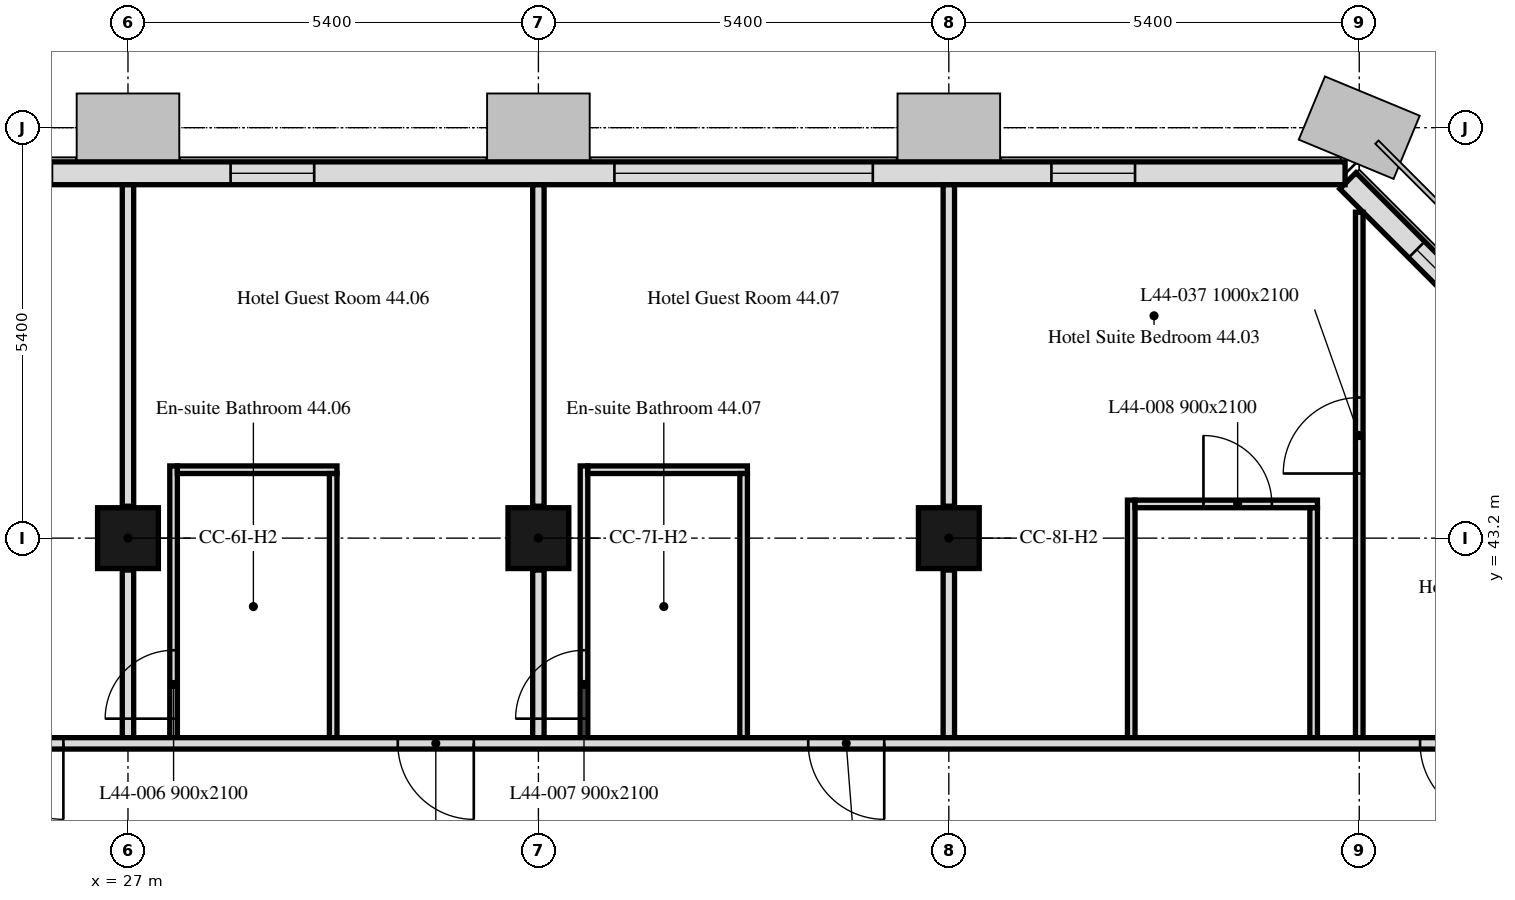
"""IFC4 building model, lengths in metres.
Left out: names, types, materials, properties, quantities, classifications, styles, units other than length and angle.
Written with IfcOpenShell. Run it as: python <this file> out.ifc"""

import sys

from ifc_helpers import new_model, si_unit, direction, frame, frame_2d, origin, origin_2d, place, context, subcontext, project, spatial, rectangle, extrude, element, fill, save


model = new_model("IFC4")
c1 = context("Model", 3, precision=1e-05, world=origin(), true_north=direction((0.0, 1.0)))
c2 = subcontext(c1, "Body", "Model", "MODEL_VIEW")
j1 = project(units=[si_unit("LENGTHUNIT", "METRE"), si_unit("PLANEANGLEUNIT", "RADIAN")], contexts=[c1])
p1 = place(None, origin())
s1 = spatial("IfcSite", under=j1, at=p1, CompositionType="ELEMENT")
p2 = place(p1, origin())
s2 = spatial("IfcBuilding", under=s1, at=p2, CompositionType="ELEMENT")
p3 = place(p2, frame((0.0, 0.0, 184.0)))
s3 = spatial("IfcBuildingStorey", under=s2, at=p3, CompositionType="ELEMENT", Elevation=184.0)
for number, where, z_axis, x_axis in (
    (1, (27.0, 43.2, 0.0), (0.0, 0.0, 1.0), (1.0, 0.0, 0.0)),
    (2, (32.4, 43.2, 0.0), (0.0, 0.0, 1.0), (1.0, 0.0, 0.0)),
    (3, (37.8, 43.2, 0.0), (0.0, 0.0, 1.0), (1.0, 0.0, 0.0)),
):
    element("IfcColumn", number, at=place(p3, frame(where, z_axis=z_axis, x_axis=x_axis)), inside=s3, PredefinedType="COLUMN", context=c2, shape_type="SweptSolid", body=[
        extrude(rectangle(XDim=0.8, YDim=0.8, at=origin_2d()), origin(), (0.0, 0.0, 1.0), 3.0),
    ])
p4 = place(p3, frame((47.901, 43.051, 0.0), z_axis=(0.0, 0.0, 1.0), x_axis=(-0.707106781187, 0.707106781187, 0.0)))
e4 = element("IfcWall", 4, at=p4, inside=s3, PredefinedType="SOLIDWALL", context=c2, shape_type="SweptSolid", body=[
    extrude(rectangle(XDim=6.86, YDim=0.3, at=frame_2d((3.43, 0.0))), origin(), (0.0, 0.0, 1.0), 3.0),
])
p5 = place(p4, frame((1.28, 0.0, 0.9)))
e5 = element("IfcOpeningElement", 5, at=p5, cuts=e4, PredefinedType="OPENING", context=c2, shape_type="SweptSolid", body=[
    extrude(rectangle(XDim=1.1, YDim=1.7, at=frame_2d((0.55, 0.85))), frame((0.0, 0.16, 0.0), z_axis=(0.0, -1.0, 0.0), x_axis=(1.0, 0.0, 0.0)), (0.0, 0.0, 1.0), 0.32),
])
p6 = place(p4, frame((4.48, 0.0, 0.9)))
e6 = element("IfcOpeningElement", 6, at=p6, cuts=e4, PredefinedType="OPENING", context=c2, shape_type="SweptSolid", body=[
    extrude(rectangle(XDim=1.1, YDim=1.7, at=frame_2d((0.55, 0.85))), frame((0.0, 0.16, 0.0), z_axis=(0.0, -1.0, 0.0), x_axis=(1.0, 0.0, 0.0)), (0.0, 0.0, 1.0), 0.32),
])
p7 = place(p3, frame((43.014, 48.0, 0.0), z_axis=(0.0, 0.0, 1.0), x_axis=(-1.0, 0.0, 0.0)))
e7 = element("IfcWall", 7, at=p7, inside=s3, PredefinedType="SOLIDWALL", context=c2, shape_type="SweptSolid", body=[
    extrude(rectangle(XDim=32.027, YDim=0.3, at=frame_2d((16.014, 0.0))), origin(), (0.0, 0.0, 1.0), 3.0),
])
p8 = place(p7, frame((2.764, 0.0, 0.9)))
e8 = element("IfcOpeningElement", 8, at=p8, cuts=e7, PredefinedType="OPENING", context=c2, shape_type="SweptSolid", body=[
    extrude(rectangle(XDim=1.1, YDim=1.7, at=frame_2d((0.55, 0.85))), frame((0.0, 0.16, 0.0), z_axis=(0.0, -1.0, 0.0), x_axis=(1.0, 0.0, 0.0)), (0.0, 0.0, 1.0), 0.32),
])
p9 = place(p7, frame((6.214, 0.0, 0.9)))
e9 = element("IfcOpeningElement", 9, at=p9, cuts=e7, PredefinedType="OPENING", context=c2, shape_type="SweptSolid", body=[
    extrude(rectangle(XDim=3.4, YDim=1.7, at=frame_2d((1.7, 0.85))), frame((0.0, 0.16, 0.0), z_axis=(0.0, -1.0, 0.0), x_axis=(1.0, 0.0, 0.0)), (0.0, 0.0, 1.0), 0.32),
])
p10 = place(p7, frame((13.564, 0.0, 0.9)))
e10 = element("IfcOpeningElement", 10, at=p10, cuts=e7, PredefinedType="OPENING", context=c2, shape_type="SweptSolid", body=[
    extrude(rectangle(XDim=1.1, YDim=1.7, at=frame_2d((0.55, 0.85))), frame((0.0, 0.16, 0.0), z_axis=(0.0, -1.0, 0.0), x_axis=(1.0, 0.0, 0.0)), (0.0, 0.0, 1.0), 0.32),
])
p11 = place(p7, frame((17.014, 0.0, 0.9)))
e11 = element("IfcOpeningElement", 11, at=p11, cuts=e7, PredefinedType="OPENING", context=c2, shape_type="SweptSolid", body=[
    extrude(rectangle(XDim=3.4, YDim=1.7, at=frame_2d((1.7, 0.85))), frame((0.0, 0.16, 0.0), z_axis=(0.0, -1.0, 0.0), x_axis=(1.0, 0.0, 0.0)), (0.0, 0.0, 1.0), 0.32),
])
p12 = place(p7, frame((24.364, 0.0, 0.9)))
e12 = element("IfcOpeningElement", 12, at=p12, cuts=e7, PredefinedType="OPENING", context=c2, shape_type="SweptSolid", body=[
    extrude(rectangle(XDim=1.1, YDim=1.7, at=frame_2d((0.55, 0.85))), frame((0.0, 0.16, 0.0), z_axis=(0.0, -1.0, 0.0), x_axis=(1.0, 0.0, 0.0)), (0.0, 0.0, 1.0), 0.32),
])
p13 = place(p7, frame((27.814, 0.0, 0.9)))
e13 = element("IfcOpeningElement", 13, at=p13, cuts=e7, PredefinedType="OPENING", context=c2, shape_type="SweptSolid", body=[
    extrude(rectangle(XDim=3.4, YDim=1.7, at=frame_2d((1.7, 0.85))), frame((0.0, 0.16, 0.0), z_axis=(0.0, -1.0, 0.0), x_axis=(1.0, 0.0, 0.0)), (0.0, 0.0, 1.0), 0.32),
])
p14 = place(p3, frame((27.0, 40.575, 0.0), z_axis=(0.0, 0.0, 1.0), x_axis=(0.0, 1.0, 0.0)))
e14 = element("IfcWall", 14, at=p14, inside=s3, PredefinedType="PARTITIONING", context=c2, shape_type="SweptSolid", body=[
    extrude(rectangle(XDim=2.205, YDim=0.15, at=frame_2d((1.103, 0.0))), origin(), (0.0, 0.0, 1.0), 2.4),
])
p15 = place(p3, frame((27.0, 43.62, 0.0), z_axis=(0.0, 0.0, 1.0), x_axis=(0.0, 1.0, 0.0)))
e15 = element("IfcWall", 15, at=p15, inside=s3, PredefinedType="PARTITIONING", context=c2, shape_type="SweptSolid", body=[
    extrude(rectangle(XDim=4.229, YDim=0.15, at=frame_2d((2.115, 0.0))), origin(), (0.0, 0.0, 1.0), 2.4),
])
p16 = place(p3, frame((27.6, 40.575, 0.0), z_axis=(0.0, 0.0, 1.0), x_axis=(0.0, 1.0, 0.0)))
e16 = element("IfcWall", 16, at=p16, inside=s3, PredefinedType="PARTITIONING", context=c2, shape_type="SweptSolid", body=[
    extrude(rectangle(XDim=3.575, YDim=0.1, at=frame_2d((1.788, 0.0))), origin(), (0.0, 0.0, 1.0), 3.0),
])
p17 = place(p16, frame((0.25, 0.0, 0.0)))
e17 = element("IfcOpeningElement", 17, at=p17, cuts=e16, PredefinedType="OPENING", context=c2, shape_type="SweptSolid", body=[
    extrude(rectangle(XDim=0.9, YDim=2.1, at=frame_2d((0.45, 1.05))), frame((0.0, 0.05, 0.0), z_axis=(0.0, -1.0, 0.0), x_axis=(1.0, 0.0, 0.0)), (0.0, 0.0, 1.0), 0.1),
])
p18 = place(p3, frame((27.65, 44.1, 0.0), z_axis=(0.0, 0.0, 1.0), x_axis=(1.0, 0.0, 0.0)))
e18 = element("IfcWall", 18, at=p18, inside=s3, PredefinedType="PARTITIONING", context=c2, shape_type="SweptSolid", body=[
    extrude(rectangle(XDim=2.1, YDim=0.1, at=frame_2d((1.05, 0.0))), origin(), (0.0, 0.0, 1.0), 3.0),
])
p19 = place(p3, frame((29.7, 44.05, 0.0), z_axis=(0.0, 0.0, 1.0), x_axis=(0.0, -1.0, 0.0)))
e19 = element("IfcWall", 19, at=p19, inside=s3, PredefinedType="PARTITIONING", context=c2, shape_type="SweptSolid", body=[
    extrude(rectangle(XDim=3.475, YDim=0.1, at=frame_2d((1.738, 0.0))), origin(), (0.0, 0.0, 1.0), 3.0),
])
p20 = place(p3, frame((32.4, 40.575, 0.0), z_axis=(0.0, 0.0, 1.0), x_axis=(0.0, 1.0, 0.0)))
e20 = element("IfcWall", 20, at=p20, inside=s3, PredefinedType="PARTITIONING", context=c2, shape_type="SweptSolid", body=[
    extrude(rectangle(XDim=2.205, YDim=0.15, at=frame_2d((1.103, 0.0))), origin(), (0.0, 0.0, 1.0), 2.4),
])
p21 = place(p3, frame((32.4, 43.62, 0.0), z_axis=(0.0, 0.0, 1.0), x_axis=(0.0, 1.0, 0.0)))
e21 = element("IfcWall", 21, at=p21, inside=s3, PredefinedType="PARTITIONING", context=c2, shape_type="SweptSolid", body=[
    extrude(rectangle(XDim=4.229, YDim=0.15, at=frame_2d((2.115, 0.0))), origin(), (0.0, 0.0, 1.0), 2.4),
])
p22 = place(p3, frame((33.0, 40.575, 0.0), z_axis=(0.0, 0.0, 1.0), x_axis=(0.0, 1.0, 0.0)))
e22 = element("IfcWall", 22, at=p22, inside=s3, PredefinedType="PARTITIONING", context=c2, shape_type="SweptSolid", body=[
    extrude(rectangle(XDim=3.575, YDim=0.1, at=frame_2d((1.788, 0.0))), origin(), (0.0, 0.0, 1.0), 3.0),
])
p23 = place(p22, frame((0.25, 0.0, 0.0)))
e23 = element("IfcOpeningElement", 23, at=p23, cuts=e22, PredefinedType="OPENING", context=c2, shape_type="SweptSolid", body=[
    extrude(rectangle(XDim=0.9, YDim=2.1, at=frame_2d((0.45, 1.05))), frame((0.0, 0.05, 0.0), z_axis=(0.0, -1.0, 0.0), x_axis=(1.0, 0.0, 0.0)), (0.0, 0.0, 1.0), 0.1),
])
p24 = place(p3, frame((33.05, 44.1, 0.0), z_axis=(0.0, 0.0, 1.0), x_axis=(1.0, 0.0, 0.0)))
e24 = element("IfcWall", 24, at=p24, inside=s3, PredefinedType="PARTITIONING", context=c2, shape_type="SweptSolid", body=[
    extrude(rectangle(XDim=2.1, YDim=0.1, at=frame_2d((1.05, 0.0))), origin(), (0.0, 0.0, 1.0), 3.0),
])
p25 = place(p3, frame((35.1, 44.05, 0.0), z_axis=(0.0, 0.0, 1.0), x_axis=(0.0, -1.0, 0.0)))
e25 = element("IfcWall", 25, at=p25, inside=s3, PredefinedType="PARTITIONING", context=c2, shape_type="SweptSolid", body=[
    extrude(rectangle(XDim=3.475, YDim=0.1, at=frame_2d((1.738, 0.0))), origin(), (0.0, 0.0, 1.0), 3.0),
])
p26 = place(p3, frame((37.8, 40.575, 0.0), z_axis=(0.0, 0.0, 1.0), x_axis=(0.0, 1.0, 0.0)))
e26 = element("IfcWall", 26, at=p26, inside=s3, PredefinedType="PARTITIONING", context=c2, shape_type="SweptSolid", body=[
    extrude(rectangle(XDim=2.205, YDim=0.15, at=frame_2d((1.103, 0.0))), origin(), (0.0, 0.0, 1.0), 2.4),
])
p27 = place(p3, frame((37.8, 43.62, 0.0), z_axis=(0.0, 0.0, 1.0), x_axis=(0.0, 1.0, 0.0)))
e27 = element("IfcWall", 27, at=p27, inside=s3, PredefinedType="PARTITIONING", context=c2, shape_type="SweptSolid", body=[
    extrude(rectangle(XDim=4.229, YDim=0.15, at=frame_2d((2.115, 0.0))), origin(), (0.0, 0.0, 1.0), 2.4),
])
p28 = place(p3, frame((40.2, 40.575, 0.0), z_axis=(0.0, 0.0, 1.0), x_axis=(0.0, 1.0, 0.0)))
e28 = element("IfcWall", 28, at=p28, inside=s3, PredefinedType="PARTITIONING", context=c2, shape_type="SweptSolid", body=[
    extrude(rectangle(XDim=3.125, YDim=0.1, at=frame_2d((1.562, 0.0))), origin(), (0.0, 0.0, 1.0), 3.0),
])
p29 = place(p3, frame((40.25, 43.65, 0.0), z_axis=(0.0, 0.0, 1.0), x_axis=(1.0, 0.0, 0.0)))
e29 = element("IfcWall", 29, at=p29, inside=s3, PredefinedType="PARTITIONING", context=c2, shape_type="SweptSolid", body=[
    extrude(rectangle(XDim=2.4, YDim=0.1, at=frame_2d((1.2, 0.0))), origin(), (0.0, 0.0, 1.0), 3.0),
])
p30 = place(p29, frame((0.9, 0.0, 0.0)))
e30 = element("IfcOpeningElement", 30, at=p30, cuts=e29, PredefinedType="OPENING", context=c2, shape_type="SweptSolid", body=[
    extrude(rectangle(XDim=0.9, YDim=2.1, at=frame_2d((0.45, 1.05))), frame((0.0, 0.05, 0.0), z_axis=(0.0, -1.0, 0.0), x_axis=(1.0, 0.0, 0.0)), (0.0, 0.0, 1.0), 0.1),
])
p31 = place(p3, frame((42.6, 43.6, 0.0), z_axis=(0.0, 0.0, 1.0), x_axis=(0.0, -1.0, 0.0)))
e31 = element("IfcWall", 31, at=p31, inside=s3, PredefinedType="PARTITIONING", context=c2, shape_type="SweptSolid", body=[
    extrude(rectangle(XDim=3.025, YDim=0.1, at=frame_2d((1.513, 0.0))), origin(), (0.0, 0.0, 1.0), 3.0),
])
p32 = place(p3, frame((43.2, 40.575, 0.0), z_axis=(0.0, 0.0, 1.0), x_axis=(0.0, 1.0, 0.0)))
e32 = element("IfcWall", 32, at=p32, inside=s3, PredefinedType="PARTITIONING", context=c2, shape_type="SweptSolid", body=[
    extrude(rectangle(XDim=6.913, YDim=0.1, at=frame_2d((3.457, 0.0))), origin(), (0.0, 0.0, 1.0), 3.0),
])
p33 = place(p32, frame((3.475, 0.0, 0.0)))
e33 = element("IfcOpeningElement", 33, at=p33, cuts=e32, PredefinedType="OPENING", context=c2, shape_type="SweptSolid", body=[
    extrude(rectangle(XDim=1.0, YDim=2.1, at=frame_2d((0.5, 1.05))), frame((0.0, 0.05, 0.0), z_axis=(0.0, -1.0, 0.0), x_axis=(1.0, 0.0, 0.0)), (0.0, 0.0, 1.0), 0.1),
])
p34 = place(p3, frame((47.849, 40.5, 0.0), z_axis=(0.0, 0.0, 1.0), x_axis=(-1.0, 0.0, 0.0)))
e34 = element("IfcWall", 34, at=p34, inside=s3, PredefinedType="PARTITIONING", context=c2, shape_type="SweptSolid", body=[
    extrude(rectangle(XDim=41.698, YDim=0.15, at=frame_2d((20.849, 0.0))), origin(), (0.0, 0.0, 1.0), 2.4),
])
p35 = place(p34, frame((37.899, 0.0, 0.0)))
e35 = element("IfcOpeningElement", 35, at=p35, cuts=e34, PredefinedType="OPENING", context=c2, shape_type="SweptSolid", body=[
    extrude(rectangle(XDim=1.0, YDim=2.1, at=frame_2d((0.5, 1.05))), frame((0.0, 0.075, 0.0), z_axis=(0.0, -1.0, 0.0), x_axis=(1.0, 0.0, 0.0)), (0.0, 0.0, 1.0), 0.15),
])
p36 = place(p34, frame((32.499, 0.0, 0.0)))
e36 = element("IfcOpeningElement", 36, at=p36, cuts=e34, PredefinedType="OPENING", context=c2, shape_type="SweptSolid", body=[
    extrude(rectangle(XDim=1.0, YDim=2.1, at=frame_2d((0.5, 1.05))), frame((0.0, 0.075, 0.0), z_axis=(0.0, -1.0, 0.0), x_axis=(1.0, 0.0, 0.0)), (0.0, 0.0, 1.0), 0.15),
])
p37 = place(p34, frame((27.099, 0.0, 0.0)))
e37 = element("IfcOpeningElement", 37, at=p37, cuts=e34, PredefinedType="OPENING", context=c2, shape_type="SweptSolid", body=[
    extrude(rectangle(XDim=1.0, YDim=2.1, at=frame_2d((0.5, 1.05))), frame((0.0, 0.075, 0.0), z_axis=(0.0, -1.0, 0.0), x_axis=(1.0, 0.0, 0.0)), (0.0, 0.0, 1.0), 0.15),
])
p38 = place(p34, frame((21.699, 0.0, 0.0)))
e38 = element("IfcOpeningElement", 38, at=p38, cuts=e34, PredefinedType="OPENING", context=c2, shape_type="SweptSolid", body=[
    extrude(rectangle(XDim=1.0, YDim=2.1, at=frame_2d((0.5, 1.05))), frame((0.0, 0.075, 0.0), z_axis=(0.0, -1.0, 0.0), x_axis=(1.0, 0.0, 0.0)), (0.0, 0.0, 1.0), 0.15),
])
p39 = place(p34, frame((16.299, 0.0, 0.0)))
e39 = element("IfcOpeningElement", 39, at=p39, cuts=e34, PredefinedType="OPENING", context=c2, shape_type="SweptSolid", body=[
    extrude(rectangle(XDim=1.0, YDim=2.1, at=frame_2d((0.5, 1.05))), frame((0.0, 0.075, 0.0), z_axis=(0.0, -1.0, 0.0), x_axis=(1.0, 0.0, 0.0)), (0.0, 0.0, 1.0), 0.15),
])
p40 = place(p34, frame((10.899, 0.0, 0.0)))
e40 = element("IfcOpeningElement", 40, at=p40, cuts=e34, PredefinedType="OPENING", context=c2, shape_type="SweptSolid", body=[
    extrude(rectangle(XDim=1.0, YDim=2.1, at=frame_2d((0.5, 1.05))), frame((0.0, 0.075, 0.0), z_axis=(0.0, -1.0, 0.0), x_axis=(1.0, 0.0, 0.0)), (0.0, 0.0, 1.0), 0.15),
])
p41 = place(p34, frame((2.849, 0.0, 0.0)))
e41 = element("IfcOpeningElement", 41, at=p41, cuts=e34, PredefinedType="OPENING", context=c2, shape_type="SweptSolid", body=[
    extrude(rectangle(XDim=1.0, YDim=2.1, at=frame_2d((0.5, 1.05))), frame((0.0, 0.075, 0.0), z_axis=(0.0, -1.0, 0.0), x_axis=(1.0, 0.0, 0.0)), (0.0, 0.0, 1.0), 0.15),
])
p42 = place(p6, origin())
e42 = element("IfcWindow", 42, at=p42, inside=s3, PartitioningType="SINGLE_PANEL", PredefinedType="WINDOW", context=c2, shape_type="SweptSolid", body=[
    extrude(rectangle(XDim=1.1, YDim=1.7, at=frame_2d((0.55, 0.85))), frame((0.0, 0.03, 0.0), z_axis=(0.0, -1.0, 0.0), x_axis=(1.0, 0.0, 0.0)), (0.0, 0.0, 1.0), 0.06),
])
fill(e6, e42)
p43 = place(p8, origin())
e43 = element("IfcWindow", 43, at=p43, inside=s3, PartitioningType="SINGLE_PANEL", PredefinedType="WINDOW", context=c2, shape_type="SweptSolid", body=[
    extrude(rectangle(XDim=1.1, YDim=1.7, at=frame_2d((0.55, 0.85))), frame((0.0, 0.03, 0.0), z_axis=(0.0, -1.0, 0.0), x_axis=(1.0, 0.0, 0.0)), (0.0, 0.0, 1.0), 0.06),
])
fill(e8, e43)
p44 = place(p9, origin())
e44 = element("IfcWindow", 44, at=p44, inside=s3, PartitioningType="SINGLE_PANEL", PredefinedType="WINDOW", context=c2, shape_type="SweptSolid", body=[
    extrude(rectangle(XDim=3.4, YDim=1.7, at=frame_2d((1.7, 0.85))), frame((0.0, 0.03, 0.0), z_axis=(0.0, -1.0, 0.0), x_axis=(1.0, 0.0, 0.0)), (0.0, 0.0, 1.0), 0.06),
])
fill(e9, e44)
p45 = place(p10, origin())
e45 = element("IfcWindow", 45, at=p45, inside=s3, PartitioningType="SINGLE_PANEL", PredefinedType="WINDOW", context=c2, shape_type="SweptSolid", body=[
    extrude(rectangle(XDim=1.1, YDim=1.7, at=frame_2d((0.55, 0.85))), frame((0.0, 0.03, 0.0), z_axis=(0.0, -1.0, 0.0), x_axis=(1.0, 0.0, 0.0)), (0.0, 0.0, 1.0), 0.06),
])
fill(e10, e45)
p46 = place(p17, origin())
e46 = element("IfcDoor", 46, at=p46, inside=s3, OperationType="SINGLE_SWING_LEFT", PredefinedType="DOOR", context=c2, shape_type="SweptSolid", body=[
    extrude(rectangle(XDim=0.9, YDim=2.1, at=frame_2d((0.45, 1.05))), frame((0.0, 0.025, 0.0), z_axis=(0.0, -1.0, 0.0), x_axis=(1.0, 0.0, 0.0)), (0.0, 0.0, 1.0), 0.05),
])
fill(e17, e46)
p47 = place(p23, origin())
e47 = element("IfcDoor", 47, at=p47, inside=s3, OperationType="SINGLE_SWING_LEFT", PredefinedType="DOOR", context=c2, shape_type="SweptSolid", body=[
    extrude(rectangle(XDim=0.9, YDim=2.1, at=frame_2d((0.45, 1.05))), frame((0.0, 0.025, 0.0), z_axis=(0.0, -1.0, 0.0), x_axis=(1.0, 0.0, 0.0)), (0.0, 0.0, 1.0), 0.05),
])
fill(e23, e47)
p48 = place(p30, origin())
e48 = element("IfcDoor", 48, at=p48, inside=s3, OperationType="SINGLE_SWING_RIGHT", PredefinedType="DOOR", context=c2, shape_type="SweptSolid", body=[
    extrude(rectangle(XDim=0.9, YDim=2.1, at=frame_2d((0.45, 1.05))), frame((0.0, 0.025, 0.0), z_axis=(0.0, -1.0, 0.0), x_axis=(1.0, 0.0, 0.0)), (0.0, 0.0, 1.0), 0.05),
])
fill(e30, e48)
p49 = place(p38, origin())
e49 = element("IfcDoor", 49, at=p49, inside=s3, OperationType="SINGLE_SWING_LEFT", PredefinedType="DOOR", context=c2, shape_type="SweptSolid", body=[
    extrude(rectangle(XDim=1.0, YDim=2.1, at=frame_2d((0.5, 1.05))), frame((0.0, 0.025, 0.0), z_axis=(0.0, -1.0, 0.0), x_axis=(1.0, 0.0, 0.0)), (0.0, 0.0, 1.0), 0.05),
])
fill(e38, e49)
p50 = place(p39, origin())
e50 = element("IfcDoor", 50, at=p50, inside=s3, OperationType="SINGLE_SWING_LEFT", PredefinedType="DOOR", context=c2, shape_type="SweptSolid", body=[
    extrude(rectangle(XDim=1.0, YDim=2.1, at=frame_2d((0.5, 1.05))), frame((0.0, 0.025, 0.0), z_axis=(0.0, -1.0, 0.0), x_axis=(1.0, 0.0, 0.0)), (0.0, 0.0, 1.0), 0.05),
])
fill(e39, e50)
p51 = place(p40, origin())
e51 = element("IfcDoor", 51, at=p51, inside=s3, OperationType="SINGLE_SWING_RIGHT", PredefinedType="DOOR", context=c2, shape_type="SweptSolid", body=[
    extrude(rectangle(XDim=1.0, YDim=2.1, at=frame_2d((0.5, 1.05))), frame((0.0, 0.025, 0.0), z_axis=(0.0, -1.0, 0.0), x_axis=(1.0, 0.0, 0.0)), (0.0, 0.0, 1.0), 0.05),
])
fill(e40, e51)
p52 = place(p33, origin())
e52 = element("IfcDoor", 52, at=p52, inside=s3, OperationType="SINGLE_SWING_RIGHT", PredefinedType="DOOR", context=c2, shape_type="SweptSolid", body=[
    extrude(rectangle(XDim=1.0, YDim=2.1, at=frame_2d((0.5, 1.05))), frame((0.0, 0.025, 0.0), z_axis=(0.0, -1.0, 0.0), x_axis=(1.0, 0.0, 0.0)), (0.0, 0.0, 1.0), 0.05),
])
fill(e33, e52)
p53 = place(p41, origin())
e53 = element("IfcDoor", 53, at=p53, inside=s3, OperationType="SINGLE_SWING_LEFT", PredefinedType="DOOR", context=c2, shape_type="SweptSolid", body=[
    extrude(rectangle(XDim=1.0, YDim=2.1, at=frame_2d((0.5, 1.05))), frame((0.0, 0.025, 0.0), z_axis=(0.0, -1.0, 0.0), x_axis=(1.0, 0.0, 0.0)), (0.0, 0.0, 1.0), 0.05),
])
fill(e41, e53)
save(model, sys.argv[1])
